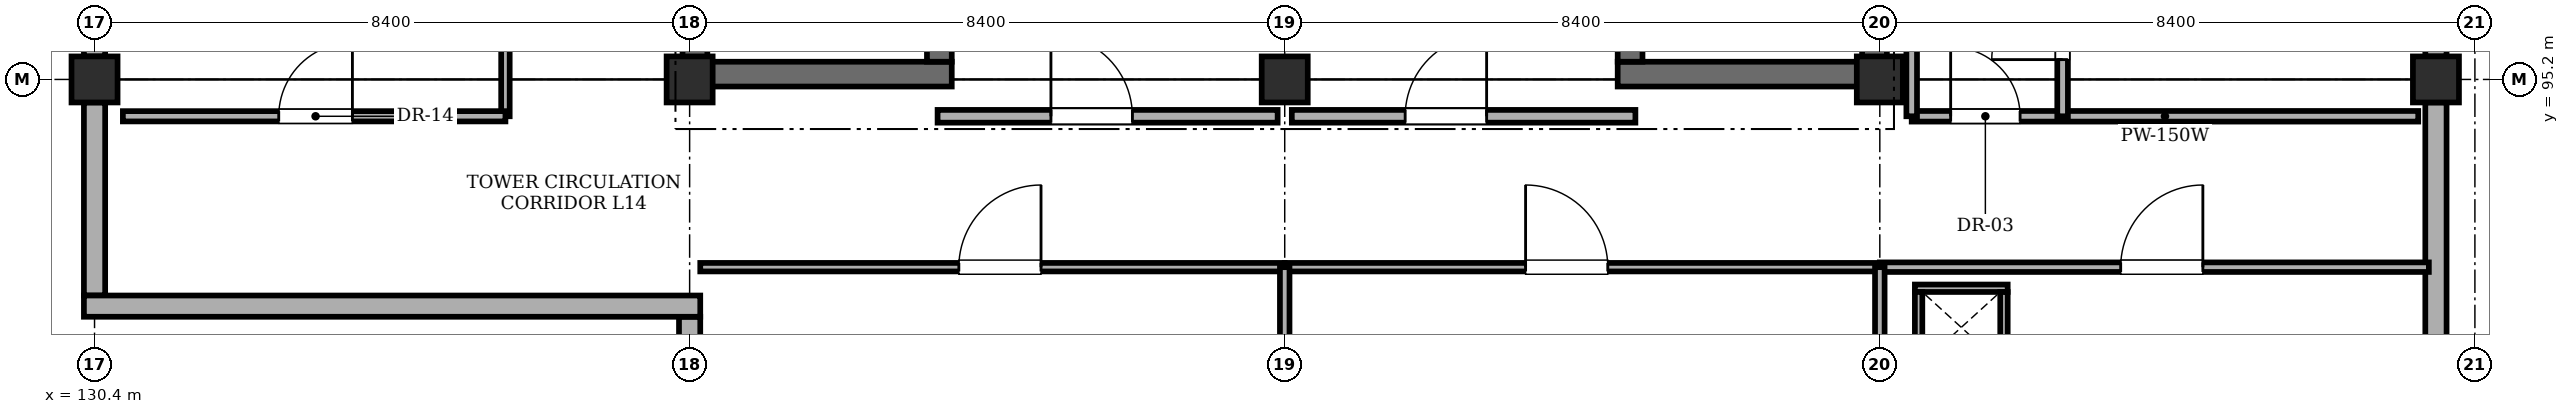
"""IFC4 building model, lengths in metres.
Left out: names, types, materials, properties, quantities, classifications, styles, units other than length and angle.
Written with IfcOpenShell. Run it as: python <this file> out.ifc"""

import sys

from ifc_helpers import new_model, si_unit, direction, frame, frame_2d, origin, origin_2d, place, context, subcontext, project, spatial, rectangle, extrude, element, fill, save


model = new_model("IFC4")
c1 = context("Model", 3, precision=1e-05, world=origin(), true_north=direction((0.0, 1.0)))
c2 = subcontext(c1, "Body", "Model", "MODEL_VIEW")
j1 = project(units=[si_unit("LENGTHUNIT", "METRE"), si_unit("PLANEANGLEUNIT", "RADIAN")], contexts=[c1])
p1 = place(None, origin())
s1 = spatial("IfcSite", under=j1, at=p1, CompositionType="ELEMENT")
p2 = place(p1, origin())
s2 = spatial("IfcBuilding", under=s1, at=p2, CompositionType="ELEMENT")
p3 = place(p2, frame((0.0, 0.0, 57.0)))
s3 = spatial("IfcBuildingStorey", under=s2, at=p3, CompositionType="ELEMENT", Elevation=57.0)
for number, where, z_axis, x_axis in (
    (1, (130.4, 95.2, 0.0), (0.0, 0.0, 1.0), (1.0, 0.0, 0.0)),
    (2, (138.8, 95.2, 0.0), (0.0, 0.0, 1.0), (1.0, 0.0, 0.0)),
    (3, (147.2, 95.2, 0.0), (0.0, 0.0, 1.0), (1.0, 0.0, 0.0)),
    (4, (155.6, 95.2, 0.0), (0.0, 0.0, 1.0), (1.0, 0.0, 0.0)),
    (5, (163.45, 95.2, 0.0), (0.0, 0.0, 1.0), (1.0, 0.0, 0.0)),
):
    element("IfcColumn", number, at=place(p3, frame(where, z_axis=z_axis, x_axis=x_axis)), inside=s3, PredefinedType="COLUMN", context=c2, shape_type="SweptSolid", body=[
        extrude(rectangle(XDim=0.65, YDim=0.65, at=origin_2d()), origin(), (0.0, 0.0, 1.0), 4.02),
    ])
p4 = place(p3, frame((138.7, 95.275, 0.0), z_axis=(0.0, 0.0, 1.0), x_axis=(1.0, 0.0, 0.0)))
e6 = element("IfcWall", 6, at=p4, inside=s3, PredefinedType="SHEAR", context=c2, shape_type="SweptSolid", body=[
    extrude(rectangle(XDim=3.8, YDim=0.35, at=frame_2d((1.9, 0.0))), origin(), (0.0, 0.0, 1.0), 4.02),
])
p5 = place(p3, frame((138.875, 95.45, 0.0), z_axis=(0.0, 0.0, 1.0), x_axis=(0.0, 1.0, 0.0)))
e7 = element("IfcWall", 7, at=p5, inside=s3, PredefinedType="SHEAR", context=c2, shape_type="SweptSolid", body=[
    extrude(rectangle(XDim=7.9, YDim=0.35, at=frame_2d((3.95, 0.0))), origin(), (0.0, 0.0, 1.0), 4.02),
])
p6 = place(p3, frame((142.325, 95.45, 0.0), z_axis=(0.0, 0.0, 1.0), x_axis=(0.0, 1.0, 0.0)))
e8 = element("IfcWall", 8, at=p6, inside=s3, PredefinedType="SHEAR", context=c2, shape_type="SweptSolid", body=[
    extrude(rectangle(XDim=7.9, YDim=0.35, at=frame_2d((3.95, 0.0))), origin(), (0.0, 0.0, 1.0), 4.02),
])
p7 = place(p6, frame((0.22, 0.0, 0.0)))
e9 = element("IfcOpeningElement", 9, at=p7, cuts=e8, PredefinedType="OPENING", context=c2, shape_type="SweptSolid", body=[
    extrude(rectangle(XDim=1.15, YDim=2.15, at=frame_2d((0.575, 1.075))), frame((0.0, 0.185, 0.0), z_axis=(0.0, -1.0, 0.0), x_axis=(1.0, 0.0, 0.0)), (0.0, 0.0, 1.0), 0.37),
])
p8 = place(p3, frame((151.9, 95.275, 0.0), z_axis=(0.0, 0.0, 1.0), x_axis=(1.0, 0.0, 0.0)))
e10 = element("IfcWall", 10, at=p8, inside=s3, PredefinedType="SHEAR", context=c2, shape_type="SweptSolid", body=[
    extrude(rectangle(XDim=3.8, YDim=0.35, at=frame_2d((1.9, 0.0))), origin(), (0.0, 0.0, 1.0), 4.02),
])
p9 = place(p3, frame((152.075, 95.45, 0.0), z_axis=(0.0, 0.0, 1.0), x_axis=(0.0, 1.0, 0.0)))
e11 = element("IfcWall", 11, at=p9, inside=s3, PredefinedType="SHEAR", context=c2, shape_type="SweptSolid", body=[
    extrude(rectangle(XDim=7.9, YDim=0.35, at=frame_2d((3.95, 0.0))), origin(), (0.0, 0.0, 1.0), 4.02),
])
p10 = place(p9, frame((0.35, 0.0, 0.0)))
e12 = element("IfcOpeningElement", 12, at=p10, cuts=e11, PredefinedType="OPENING", context=c2, shape_type="SweptSolid", body=[
    extrude(rectangle(XDim=1.15, YDim=2.15, at=frame_2d((0.575, 1.075))), frame((0.0, 0.185, 0.0), z_axis=(0.0, -1.0, 0.0), x_axis=(1.0, 0.0, 0.0)), (0.0, 0.0, 1.0), 0.37),
])
p11 = place(p3, frame((155.525, 95.45, 0.0), z_axis=(0.0, 0.0, 1.0), x_axis=(0.0, 1.0, 0.0)))
e13 = element("IfcWall", 13, at=p11, inside=s3, PredefinedType="SHEAR", context=c2, shape_type="SweptSolid", body=[
    extrude(rectangle(XDim=7.9, YDim=0.35, at=frame_2d((3.95, 0.0))), origin(), (0.0, 0.0, 1.0), 4.02),
])
p12 = place(p3, frame((163.45, 94.875, 0.0), z_axis=(0.0, 0.0, 1.0), x_axis=(0.0, -1.0, 0.0)))
e14 = element("IfcWall", 14, at=p12, inside=s3, PredefinedType="STANDARD", context=c2, shape_type="SweptSolid", body=[
    extrude(rectangle(XDim=7.75, YDim=0.3, at=frame_2d((3.875, 0.0))), origin(), (0.0, 0.0, 1.0), 3.32),
])
p13 = place(p12, frame((4.2, 0.0, 1.1)))
e15 = element("IfcOpeningElement", 15, at=p13, cuts=e14, PredefinedType="OPENING", context=c2, shape_type="SweptSolid", body=[
    extrude(rectangle(XDim=1.8, YDim=1.8, at=frame_2d((0.9, 0.9))), frame((0.0, 0.16, 0.0), z_axis=(0.0, -1.0, 0.0), x_axis=(1.0, 0.0, 0.0)), (0.0, 0.0, 1.0), 0.32),
])
p14 = place(p3, frame((163.45, 103.275, 0.0), z_axis=(0.0, 0.0, 1.0), x_axis=(0.0, -1.0, 0.0)))
e16 = element("IfcWall", 16, at=p14, inside=s3, PredefinedType="STANDARD", context=c2, shape_type="SweptSolid", body=[
    extrude(rectangle(XDim=7.75, YDim=0.3, at=frame_2d((3.875, 0.0))), origin(), (0.0, 0.0, 1.0), 3.32),
])
p15 = place(p14, frame((1.15, 0.0, 1.1)))
e17 = element("IfcOpeningElement", 17, at=p15, cuts=e16, PredefinedType="OPENING", context=c2, shape_type="SweptSolid", body=[
    extrude(rectangle(XDim=1.4, YDim=1.4, at=frame_2d((0.7, 0.7))), frame((0.0, 0.16, 0.0), z_axis=(0.0, -1.0, 0.0), x_axis=(1.0, 0.0, 0.0)), (0.0, 0.0, 1.0), 0.32),
])
p16 = place(p3, frame((130.4, 92.15, 0.0), z_axis=(0.0, 0.0, 1.0), x_axis=(0.0, 1.0, 0.0)))
e18 = element("IfcWall", 18, at=p16, inside=s3, PredefinedType="STANDARD", context=c2, shape_type="SweptSolid", body=[
    extrude(rectangle(XDim=2.725, YDim=0.3, at=frame_2d((1.363, 0.0))), origin(), (0.0, 0.0, 1.0), 4.02),
])
p17 = place(p3, frame((138.8, 87.125, 0.0), z_axis=(0.0, 0.0, 1.0), x_axis=(0.0, 1.0, 0.0)))
e19 = element("IfcWall", 19, at=p17, inside=s3, PredefinedType="STANDARD", context=c2, shape_type="SweptSolid", body=[
    extrude(rectangle(XDim=4.725, YDim=0.3, at=frame_2d((2.363, 0.0))), origin(), (0.0, 0.0, 1.0), 3.32),
])
p18 = place(p17, frame((2.4, 0.0, 0.95)))
e20 = element("IfcOpeningElement", 20, at=p18, cuts=e19, PredefinedType="OPENING", context=c2, shape_type="SweptSolid", body=[
    extrude(rectangle(XDim=1.5, YDim=1.8, at=frame_2d((0.75, 0.9))), frame((0.0, 0.16, 0.0), z_axis=(0.0, -1.0, 0.0), x_axis=(1.0, 0.0, 0.0)), (0.0, 0.0, 1.0), 0.32),
])
p19 = place(p3, frame((130.4, 95.525, 0.0), z_axis=(0.0, 0.0, 1.0), x_axis=(0.0, 1.0, 0.0)))
e21 = element("IfcWall", 21, at=p19, inside=s3, PredefinedType="STANDARD", context=c2, shape_type="SweptSolid", body=[
    extrude(rectangle(XDim=7.75, YDim=0.3, at=frame_2d((3.875, 0.0))), origin(), (0.0, 0.0, 1.0), 3.32),
])
p20 = place(p19, frame((2.4, 0.0, 1.0)))
e22 = element("IfcOpeningElement", 22, at=p20, cuts=e21, PredefinedType="OPENING", context=c2, shape_type="SweptSolid", body=[
    extrude(rectangle(XDim=1.8, YDim=1.8, at=frame_2d((0.9, 0.9))), frame((0.0, 0.16, 0.0), z_axis=(0.0, -1.0, 0.0), x_axis=(1.0, 0.0, 0.0)), (0.0, 0.0, 1.0), 0.32),
])
p21 = place(p3, frame((138.95, 92.0, 0.0), z_axis=(0.0, 0.0, 1.0), x_axis=(-1.0, 0.0, 0.0)))
e23 = element("IfcWall", 23, at=p21, inside=s3, PredefinedType="STANDARD", context=c2, shape_type="SweptSolid", body=[
    extrude(rectangle(XDim=8.7, YDim=0.3, at=frame_2d((4.35, 0.0))), origin(), (0.0, 0.0, 1.0), 4.02),
])
p22 = place(p3, frame((142.3, 94.68, 0.0), z_axis=(0.0, 0.0, 1.0), x_axis=(1.0, 0.0, 0.0)))
e24 = element("IfcWall", 24, at=p22, inside=s3, PredefinedType="STANDARD", context=c2, shape_type="SweptSolid", body=[
    extrude(rectangle(XDim=4.8, YDim=0.18, at=frame_2d((2.4, 0.0))), origin(), (0.0, 0.0, 1.0), 4.02),
])
p23 = place(p22, frame((1.6, 0.0, 0.0)))
e25 = element("IfcOpeningElement", 25, at=p23, cuts=e24, PredefinedType="OPENING", context=c2, shape_type="SweptSolid", body=[
    extrude(rectangle(XDim=1.15, YDim=2.15, at=frame_2d((0.575, 1.075))), frame((0.0, 0.1, 0.0), z_axis=(0.0, -1.0, 0.0), x_axis=(1.0, 0.0, 0.0)), (0.0, 0.0, 1.0), 0.2),
])
p24 = place(p3, frame((147.3, 94.68, 0.0), z_axis=(0.0, 0.0, 1.0), x_axis=(1.0, 0.0, 0.0)))
e26 = element("IfcWall", 26, at=p24, inside=s3, PredefinedType="STANDARD", context=c2, shape_type="SweptSolid", body=[
    extrude(rectangle(XDim=4.85, YDim=0.18, at=frame_2d((2.425, 0.0))), origin(), (0.0, 0.0, 1.0), 4.02),
])
p25 = place(p24, frame((1.6, 0.0, 0.0)))
e27 = element("IfcOpeningElement", 27, at=p25, cuts=e26, PredefinedType="OPENING", context=c2, shape_type="SweptSolid", body=[
    extrude(rectangle(XDim=1.15, YDim=2.15, at=frame_2d((0.575, 1.075))), frame((0.0, 0.1, 0.0), z_axis=(0.0, -1.0, 0.0), x_axis=(1.0, 0.0, 0.0)), (0.0, 0.0, 1.0), 0.2),
])
p26 = place(p3, frame((156.05, 94.68, 0.0), z_axis=(0.0, 0.0, 1.0), x_axis=(1.0, 0.0, 0.0)))
e28 = element("IfcWall", 28, at=p26, inside=s3, PredefinedType="PARTITIONING", context=c2, shape_type="SweptSolid", body=[
    extrude(rectangle(XDim=7.15, YDim=0.15, at=frame_2d((3.575, 0.0))), origin(), (0.0, 0.0, 1.0), 4.02),
])
p27 = place(p26, frame((0.55, 0.0, 0.0)))
e29 = element("IfcOpeningElement", 29, at=p27, cuts=e28, PredefinedType="OPENING", context=c2, shape_type="SweptSolid", body=[
    extrude(rectangle(XDim=0.98, YDim=2.12, at=frame_2d((0.49, 1.06))), frame((0.0, 0.085, 0.0), z_axis=(0.0, -1.0, 0.0), x_axis=(1.0, 0.0, 0.0)), (0.0, 0.0, 1.0), 0.17),
])
p28 = place(p3, frame((158.18, 94.68, 0.0), z_axis=(0.0, 0.0, 1.0), x_axis=(0.0, 1.0, 0.0)))
e30 = element("IfcWall", 30, at=p28, inside=s3, PredefinedType="PARTITIONING", context=c2, shape_type="SweptSolid", body=[
    extrude(rectangle(XDim=8.57, YDim=0.15, at=frame_2d((4.285, 0.0))), origin(), (0.0, 0.0, 1.0), 4.02),
])
p29 = place(p28, frame((0.8, 0.0, 0.0)))
e31 = element("IfcOpeningElement", 31, at=p29, cuts=e30, PredefinedType="OPENING", context=c2, shape_type="SweptSolid", body=[
    extrude(rectangle(XDim=1.0, YDim=2.12, at=frame_2d((0.5, 1.06))), frame((0.0, 0.085, 0.0), z_axis=(0.0, -1.0, 0.0), x_axis=(1.0, 0.0, 0.0)), (0.0, 0.0, 1.0), 0.17),
])
p30 = place(p28, frame((3.5, 0.0, 0.0)))
e32 = element("IfcOpeningElement", 32, at=p30, cuts=e30, PredefinedType="OPENING", context=c2, shape_type="SweptSolid", body=[
    extrude(rectangle(XDim=0.92, YDim=2.1, at=frame_2d((0.46, 1.05))), frame((0.0, 0.085, 0.0), z_axis=(0.0, -1.0, 0.0), x_axis=(1.0, 0.0, 0.0)), (0.0, 0.0, 1.0), 0.17),
])
p31 = place(p28, frame((6.4, 0.0, 0.0)))
e33 = element("IfcOpeningElement", 33, at=p31, cuts=e30, PredefinedType="OPENING", context=c2, shape_type="SweptSolid", body=[
    extrude(rectangle(XDim=0.92, YDim=2.1, at=frame_2d((0.46, 1.05))), frame((0.0, 0.085, 0.0), z_axis=(0.0, -1.0, 0.0), x_axis=(1.0, 0.0, 0.0)), (0.0, 0.0, 1.0), 0.17),
])
p32 = place(p3, frame((156.05, 94.68, 0.0), z_axis=(0.0, 0.0, 1.0), x_axis=(0.0, 1.0, 0.0)))
e34 = element("IfcWall", 34, at=p32, inside=s3, PredefinedType="PARTITIONING", context=c2, shape_type="SweptSolid", body=[
    extrude(rectangle(XDim=8.57, YDim=0.15, at=frame_2d((4.285, 0.0))), origin(), (0.0, 0.0, 1.0), 4.02),
])
p33 = place(p3, frame((136.2, 94.68, 0.0), z_axis=(0.0, 0.0, 1.0), x_axis=(0.0, 1.0, 0.0)))
e35 = element("IfcWall", 35, at=p33, inside=s3, PredefinedType="PARTITIONING", context=c2, shape_type="SweptSolid", body=[
    extrude(rectangle(XDim=9.07, YDim=0.12, at=frame_2d((4.535, 0.0))), origin(), (0.0, 0.0, 1.0), 4.02),
])
p34 = place(p3, frame((130.8, 94.68, 0.0), z_axis=(0.0, 0.0, 1.0), x_axis=(1.0, 0.0, 0.0)))
e36 = element("IfcWall", 36, at=p34, inside=s3, PredefinedType="PARTITIONING", context=c2, shape_type="SweptSolid", body=[
    extrude(rectangle(XDim=5.4, YDim=0.145, at=frame_2d((2.7, 0.0))), origin(), (0.0, 0.0, 1.0), 4.02),
])
p35 = place(p34, frame((2.2, 0.0, 0.0)))
e37 = element("IfcOpeningElement", 37, at=p35, cuts=e36, PredefinedType="OPENING", context=c2, shape_type="SweptSolid", body=[
    extrude(rectangle(XDim=1.04, YDim=2.16, at=frame_2d((0.52, 1.08))), frame((0.0, 0.083, 0.0), z_axis=(0.0, -1.0, 0.0), x_axis=(1.0, 0.0, 0.0)), (0.0, 0.0, 1.0), 0.165),
])
p36 = place(p3, frame((138.95, 92.55, 0.0), z_axis=(0.0, 0.0, 1.0), x_axis=(1.0, 0.0, 0.0)))
e38 = element("IfcWall", 38, at=p36, inside=s3, PredefinedType="PARTITIONING", context=c2, shape_type="SweptSolid", body=[
    extrude(rectangle(XDim=8.25, YDim=0.12, at=frame_2d((4.125, 0.0))), origin(), (0.0, 0.0, 1.0), 4.02),
])
p37 = place(p36, frame((3.65, 0.0, 0.0)))
e39 = element("IfcOpeningElement", 39, at=p37, cuts=e38, PredefinedType="OPENING", context=c2, shape_type="SweptSolid", body=[
    extrude(rectangle(XDim=1.16, YDim=2.2, at=frame_2d((0.58, 1.1))), frame((0.0, 0.07, 0.0), z_axis=(0.0, -1.0, 0.0), x_axis=(1.0, 0.0, 0.0)), (0.0, 0.0, 1.0), 0.14),
])
p38 = place(p3, frame((147.2, 92.55, 0.0), z_axis=(0.0, 0.0, 1.0), x_axis=(1.0, 0.0, 0.0)))
e40 = element("IfcWall", 40, at=p38, inside=s3, PredefinedType="PARTITIONING", context=c2, shape_type="SweptSolid", body=[
    extrude(rectangle(XDim=8.4, YDim=0.12, at=frame_2d((4.2, 0.0))), origin(), (0.0, 0.0, 1.0), 4.02),
])
p39 = place(p38, frame((3.4, 0.0, 0.0)))
e41 = element("IfcOpeningElement", 41, at=p39, cuts=e40, PredefinedType="OPENING", context=c2, shape_type="SweptSolid", body=[
    extrude(rectangle(XDim=1.16, YDim=2.2, at=frame_2d((0.58, 1.1))), frame((0.0, 0.07, 0.0), z_axis=(0.0, -1.0, 0.0), x_axis=(1.0, 0.0, 0.0)), (0.0, 0.0, 1.0), 0.14),
])
p40 = place(p3, frame((147.2, 78.55, 0.0), z_axis=(0.0, 0.0, 1.0), x_axis=(0.0, 1.0, 0.0)))
e42 = element("IfcWall", 42, at=p40, inside=s3, PredefinedType="PARTITIONING", context=c2, shape_type="SweptSolid", body=[
    extrude(rectangle(XDim=14.0, YDim=0.135, at=frame_2d((7.0, 0.0))), origin(), (0.0, 0.0, 1.0), 3.32),
])
p41 = place(p3, frame((155.6, 92.55, 0.0), z_axis=(0.0, 0.0, 1.0), x_axis=(1.0, 0.0, 0.0)))
e43 = element("IfcWall", 43, at=p41, inside=s3, PredefinedType="PARTITIONING", context=c2, shape_type="SweptSolid", body=[
    extrude(rectangle(XDim=7.75, YDim=0.135, at=frame_2d((3.875, 0.0))), origin(), (0.0, 0.0, 1.0), 4.02),
])
p42 = place(p41, frame((3.4, 0.0, 0.0)))
e44 = element("IfcOpeningElement", 44, at=p42, cuts=e43, PredefinedType="OPENING", context=c2, shape_type="SweptSolid", body=[
    extrude(rectangle(XDim=1.16, YDim=2.2, at=frame_2d((0.58, 1.1))), frame((0.0, 0.077, 0.0), z_axis=(0.0, -1.0, 0.0), x_axis=(1.0, 0.0, 0.0)), (0.0, 0.0, 1.0), 0.155),
])
p43 = place(p3, frame((155.6, 78.55, 0.0), z_axis=(0.0, 0.0, 1.0), x_axis=(0.0, 1.0, 0.0)))
e45 = element("IfcWall", 45, at=p43, inside=s3, PredefinedType="PARTITIONING", context=c2, shape_type="SweptSolid", body=[
    extrude(rectangle(XDim=14.0, YDim=0.135, at=frame_2d((7.0, 0.0))), origin(), (0.0, 0.0, 1.0), 3.32),
])
p44 = place(p3, frame((156.095, 92.252, 0.0), z_axis=(0.0, 0.0, 1.0), x_axis=(1.0, 0.0, 0.0)))
e46 = element("IfcWall", 46, at=p44, inside=s3, PredefinedType="PARTITIONING", context=c2, shape_type="SweptSolid", body=[
    extrude(rectangle(XDim=1.31, YDim=0.105, at=frame_2d((0.655, 0.0))), origin(), (0.0, 0.0, 1.0), 4.02),
])
for number, where, z_axis, x_axis in (
    (47, (156.147, 91.2, 0.0), (0.0, 0.0, 1.0), (0.0, 1.0, 0.0)),
    (48, (157.353, 91.2, 0.0), (0.0, 0.0, 1.0), (0.0, 1.0, 0.0)),
):
    element("IfcWall", number, at=place(p3, frame(where, z_axis=z_axis, x_axis=x_axis)), inside=s3, PredefinedType="PARTITIONING", context=c2, shape_type="SweptSolid", body=[
        extrude(rectangle(XDim=1.0, YDim=0.105, at=frame_2d((0.5, 0.0))), origin(), (0.0, 0.0, 1.0), 4.02),
    ])
p45 = place(p23, origin())
e49 = element("IfcDoor", 49, at=p45, inside=s3, OperationType="SINGLE_SWING_LEFT", PredefinedType="DOOR", context=c2, shape_type="SweptSolid", body=[
    extrude(rectangle(XDim=1.15, YDim=2.15, at=frame_2d((0.575, 1.075))), frame((0.0, 0.025, 0.0), z_axis=(0.0, -1.0, 0.0), x_axis=(1.0, 0.0, 0.0)), (0.0, 0.0, 1.0), 0.05),
])
fill(e25, e49)
p46 = place(p25, origin())
e50 = element("IfcDoor", 50, at=p46, inside=s3, OperationType="SINGLE_SWING_RIGHT", PredefinedType="DOOR", context=c2, shape_type="SweptSolid", body=[
    extrude(rectangle(XDim=1.15, YDim=2.15, at=frame_2d((0.575, 1.075))), frame((0.0, 0.025, 0.0), z_axis=(0.0, -1.0, 0.0), x_axis=(1.0, 0.0, 0.0)), (0.0, 0.0, 1.0), 0.05),
])
fill(e27, e50)
p47 = place(p27, origin())
e51 = element("IfcDoor", 51, at=p47, inside=s3, OperationType="SINGLE_SWING_LEFT", PredefinedType="DOOR", context=c2, shape_type="SweptSolid", body=[
    extrude(rectangle(XDim=0.98, YDim=2.12, at=frame_2d((0.49, 1.06))), frame((0.0, 0.025, 0.0), z_axis=(0.0, -1.0, 0.0), x_axis=(1.0, 0.0, 0.0)), (0.0, 0.0, 1.0), 0.05),
])
fill(e29, e51)
p48 = place(p29, origin())
e52 = element("IfcDoor", 52, at=p48, inside=s3, OperationType="SINGLE_SWING_LEFT", PredefinedType="DOOR", context=c2, shape_type="SweptSolid", body=[
    extrude(rectangle(XDim=1.0, YDim=2.12, at=frame_2d((0.5, 1.06))), frame((0.0, 0.025, 0.0), z_axis=(0.0, -1.0, 0.0), x_axis=(1.0, 0.0, 0.0)), (0.0, 0.0, 1.0), 0.05),
])
fill(e31, e52)
p49 = place(p35, origin())
e53 = element("IfcDoor", 53, at=p49, inside=s3, OperationType="SINGLE_SWING_RIGHT", PredefinedType="DOOR", context=c2, shape_type="SweptSolid", body=[
    extrude(rectangle(XDim=1.04, YDim=2.16, at=frame_2d((0.52, 1.08))), frame((0.0, 0.025, 0.0), z_axis=(0.0, -1.0, 0.0), x_axis=(1.0, 0.0, 0.0)), (0.0, 0.0, 1.0), 0.05),
])
fill(e37, e53)
p50 = place(p37, origin())
e54 = element("IfcDoor", 54, at=p50, inside=s3, OperationType="SINGLE_SWING_RIGHT", PredefinedType="DOOR", context=c2, shape_type="SweptSolid", body=[
    extrude(rectangle(XDim=1.16, YDim=2.2, at=frame_2d((0.58, 1.1))), frame((0.0, 0.025, 0.0), z_axis=(0.0, -1.0, 0.0), x_axis=(1.0, 0.0, 0.0)), (0.0, 0.0, 1.0), 0.05),
])
fill(e39, e54)
p51 = place(p39, origin())
e55 = element("IfcDoor", 55, at=p51, inside=s3, OperationType="SINGLE_SWING_LEFT", PredefinedType="DOOR", context=c2, shape_type="SweptSolid", body=[
    extrude(rectangle(XDim=1.16, YDim=2.2, at=frame_2d((0.58, 1.1))), frame((0.0, 0.025, 0.0), z_axis=(0.0, -1.0, 0.0), x_axis=(1.0, 0.0, 0.0)), (0.0, 0.0, 1.0), 0.05),
])
fill(e41, e55)
p52 = place(p42, origin())
e56 = element("IfcDoor", 56, at=p52, inside=s3, OperationType="SINGLE_SWING_RIGHT", PredefinedType="DOOR", context=c2, shape_type="SweptSolid", body=[
    extrude(rectangle(XDim=1.16, YDim=2.2, at=frame_2d((0.58, 1.1))), frame((0.0, 0.025, 0.0), z_axis=(0.0, -1.0, 0.0), x_axis=(1.0, 0.0, 0.0)), (0.0, 0.0, 1.0), 0.05),
])
fill(e44, e56)
save(model, sys.argv[1])
